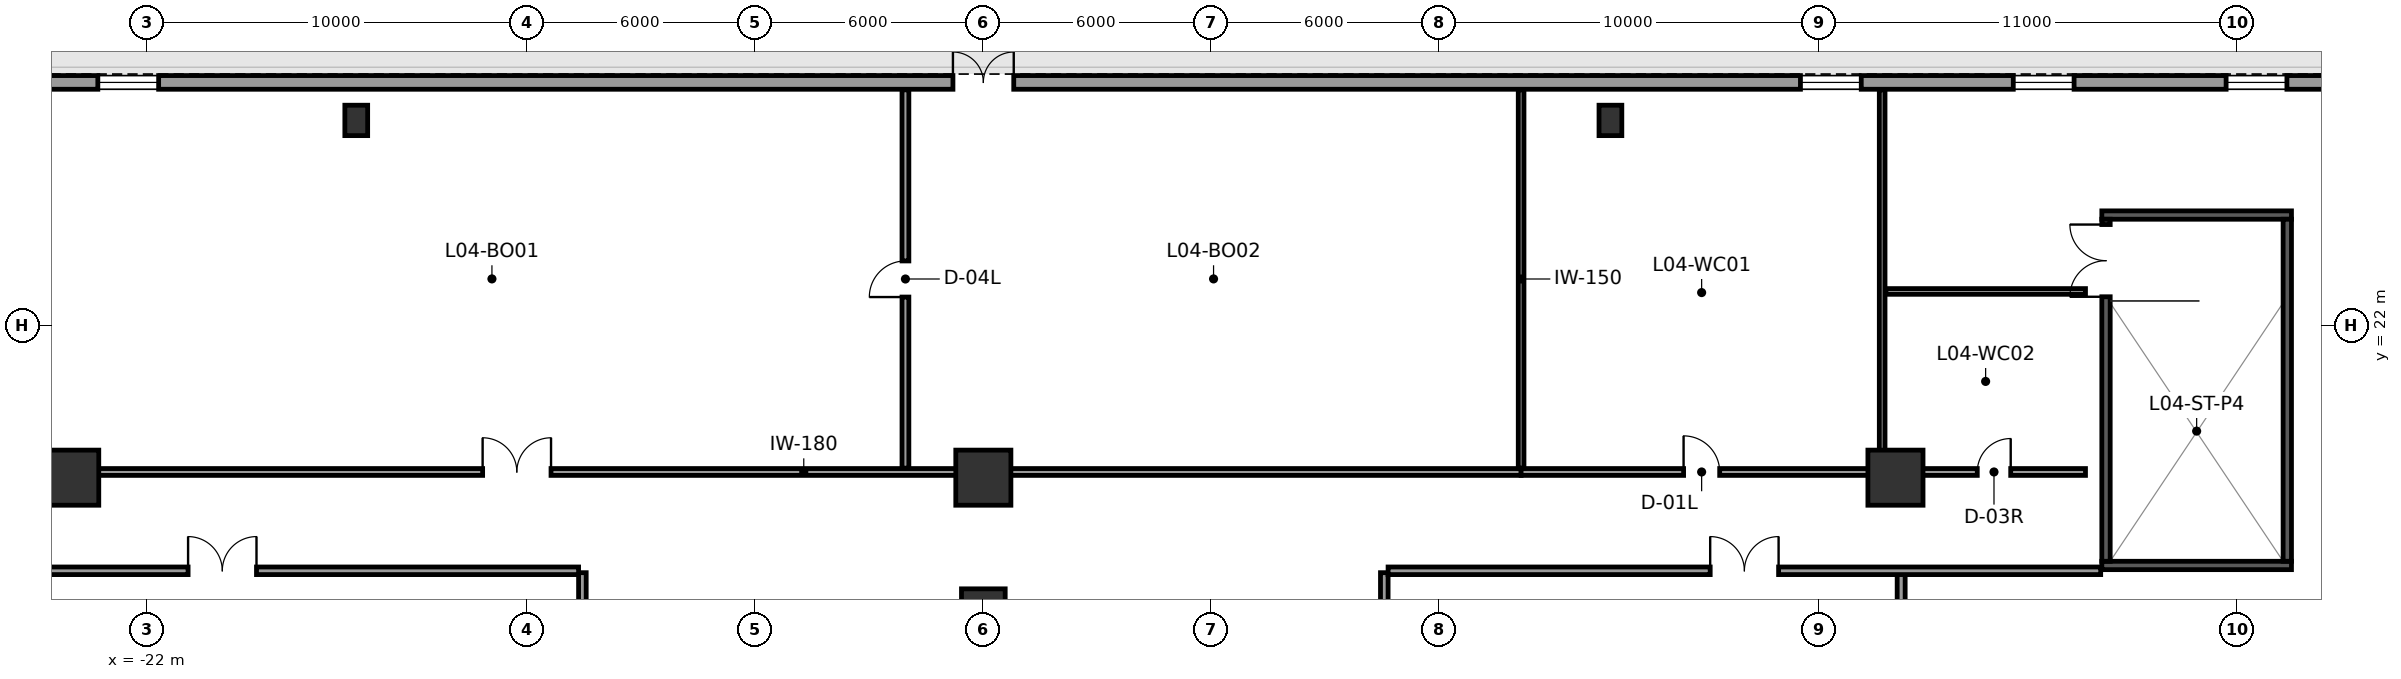
"""IFC4 building model, lengths in metres.
Left out: names, types, materials, properties, quantities, classifications, styles, units other than length and angle.
Written with IfcOpenShell. Run it as: python <this file> out.ifc"""

import sys

from ifc_helpers import new_model, si_unit, direction, frame, frame_2d, origin, origin_2d, place, context, subcontext, project, spatial, rectangle, hollow_rectangle, extrude, element, fill, save


model = new_model("IFC4")
c1 = context("Model", 3, precision=1e-05, world=origin(), true_north=direction((0.0, 1.0)))
c2 = subcontext(c1, "Body", "Model", "MODEL_VIEW")
j1 = project(units=[si_unit("LENGTHUNIT", "METRE"), si_unit("PLANEANGLEUNIT", "RADIAN")], contexts=[c1])
p1 = place(None, origin())
s1 = spatial("IfcSite", under=j1, at=p1, CompositionType="ELEMENT")
p2 = place(p1, origin())
s2 = spatial("IfcBuilding", under=s1, at=p2, CompositionType="ELEMENT")
p3 = place(p2, frame((0.0, 0.0, 23.5)))
s3 = spatial("IfcBuildingStorey", under=s2, at=p3, CompositionType="ELEMENT", Elevation=23.5)
p4 = place(p3, frame((0.0, 14.5, 0.0), z_axis=(0.0, 0.0, 1.0), x_axis=(1.0, 0.0, 0.0)))
e1 = element("IfcColumn", 1, at=p4, inside=s3, PredefinedType="COLUMN", context=c2, shape_type="SweptSolid", body=[
    extrude(rectangle(XDim=1.15, YDim=1.15, at=origin_2d()), origin(), (0.0, 0.0, 1.0), 5.5),
])
for number, where, z_axis, x_axis in (
    (2, (-24.0, 18.0, 0.0), (0.0, 0.0, 1.0), (1.0, 0.0, 0.0)),
    (3, (24.0, 18.0, 0.0), (0.0, 0.0, 1.0), (1.0, 0.0, 0.0)),
    (4, (0.0, 18.0, 0.0), (0.0, 0.0, 1.0), (1.0, 0.0, 0.0)),
):
    element("IfcColumn", number, at=place(p3, frame(where, z_axis=z_axis, x_axis=x_axis)), inside=s3, PredefinedType="COLUMN", context=c2, shape_type="SweptSolid", body=[
        extrude(rectangle(XDim=1.45, YDim=1.45, at=origin_2d()), origin(), (0.0, 0.0, 1.0), 5.5),
    ])
for number, where, z_axis, x_axis in (
    (5, (-16.5, 27.4, 0.0), (0.0, 0.0, 1.0), (1.0, 0.0, 0.0)),
    (6, (16.5, 27.4, 0.0), (0.0, 0.0, 1.0), (1.0, 0.0, 0.0)),
):
    element("IfcColumn", number, at=place(p3, frame(where, z_axis=z_axis, x_axis=x_axis)), inside=s3, PredefinedType="COLUMN", context=c2, shape_type="SweptSolid", body=[
        extrude(hollow_rectangle(XDim=0.6, YDim=0.8, WallThickness=0.05, at=origin_2d()), origin(), (0.0, 0.0, 1.0), 5.5),
    ])
p5 = place(p3, frame((-39.3, 28.4, 0.0), z_axis=(0.0, 0.0, 1.0), x_axis=(1.0, 0.0, 0.0)))
e7 = element("IfcWall", 7, at=p5, inside=s3, PredefinedType="STANDARD", context=c2, shape_type="SweptSolid", body=[
    extrude(rectangle(XDim=78.6, YDim=0.36, at=frame_2d((39.3, 0.0))), origin(), (0.0, 0.0, 1.0), 5.15),
])
p6 = place(p5, frame((38.5, 0.0, 0.0)))
e8 = element("IfcOpeningElement", 8, at=p6, cuts=e7, PredefinedType="OPENING", context=c2, shape_type="SweptSolid", body=[
    extrude(rectangle(XDim=1.6, YDim=2.2, at=frame_2d((0.8, 1.1))), frame((0.0, 0.19, 0.0), z_axis=(0.0, -1.0, 0.0), x_axis=(1.0, 0.0, 0.0)), (0.0, 0.0, 1.0), 0.38),
])
p7 = place(p5, frame((4.8, 0.0, 0.9)))
e9 = element("IfcOpeningElement", 9, at=p7, cuts=e7, PredefinedType="OPENING", context=c2, shape_type="SweptSolid", body=[
    extrude(rectangle(XDim=1.6, YDim=2.6, at=frame_2d((0.8, 1.3))), frame((0.0, 0.19, 0.0), z_axis=(0.0, -1.0, 0.0), x_axis=(1.0, 0.0, 0.0)), (0.0, 0.0, 1.0), 0.38),
])
p8 = place(p5, frame((10.4, 0.0, 0.9)))
e10 = element("IfcOpeningElement", 10, at=p8, cuts=e7, PredefinedType="OPENING", context=c2, shape_type="SweptSolid", body=[
    extrude(rectangle(XDim=1.6, YDim=2.6, at=frame_2d((0.8, 1.3))), frame((0.0, 0.19, 0.0), z_axis=(0.0, -1.0, 0.0), x_axis=(1.0, 0.0, 0.0)), (0.0, 0.0, 1.0), 0.38),
])
p9 = place(p5, frame((16.0, 0.0, 0.9)))
e11 = element("IfcOpeningElement", 11, at=p9, cuts=e7, PredefinedType="OPENING", context=c2, shape_type="SweptSolid", body=[
    extrude(rectangle(XDim=1.6, YDim=2.6, at=frame_2d((0.8, 1.3))), frame((0.0, 0.19, 0.0), z_axis=(0.0, -1.0, 0.0), x_axis=(1.0, 0.0, 0.0)), (0.0, 0.0, 1.0), 0.38),
])
p10 = place(p5, frame((60.8, 0.0, 0.9)))
e12 = element("IfcOpeningElement", 12, at=p10, cuts=e7, PredefinedType="OPENING", context=c2, shape_type="SweptSolid", body=[
    extrude(rectangle(XDim=1.6, YDim=2.6, at=frame_2d((0.8, 1.3))), frame((0.0, 0.19, 0.0), z_axis=(0.0, -1.0, 0.0), x_axis=(1.0, 0.0, 0.0)), (0.0, 0.0, 1.0), 0.38),
])
p11 = place(p5, frame((66.4, 0.0, 0.9)))
e13 = element("IfcOpeningElement", 13, at=p11, cuts=e7, PredefinedType="OPENING", context=c2, shape_type="SweptSolid", body=[
    extrude(rectangle(XDim=1.6, YDim=2.6, at=frame_2d((0.8, 1.3))), frame((0.0, 0.19, 0.0), z_axis=(0.0, -1.0, 0.0), x_axis=(1.0, 0.0, 0.0)), (0.0, 0.0, 1.0), 0.38),
])
p12 = place(p5, frame((72.0, 0.0, 0.9)))
e14 = element("IfcOpeningElement", 14, at=p12, cuts=e7, PredefinedType="OPENING", context=c2, shape_type="SweptSolid", body=[
    extrude(rectangle(XDim=1.6, YDim=2.6, at=frame_2d((0.8, 1.3))), frame((0.0, 0.19, 0.0), z_axis=(0.0, -1.0, 0.0), x_axis=(1.0, 0.0, 0.0)), (0.0, 0.0, 1.0), 0.38),
])
for number, where, z_axis, x_axis in (
    (15, (29.43, 15.69, 0.0), (0.0, 0.0, 1.0), (1.0, 0.0, 0.0)),
    (16, (29.43, 24.91, 0.0), (0.0, 0.0, 1.0), (1.0, 0.0, 0.0)),
):
    element("IfcWall", number, at=place(p3, frame(where, z_axis=z_axis, x_axis=x_axis)), inside=s3, PredefinedType="SHEAR", context=c2, shape_type="SweptSolid", body=[
        extrude(rectangle(XDim=4.99, YDim=0.22, at=frame_2d((2.495, 0.0))), origin(), (0.0, 0.0, 1.0), 5.15),
    ])
p13 = place(p3, frame((29.54, 15.8, 0.0), z_axis=(0.0, 0.0, 1.0), x_axis=(0.0, 1.0, 0.0)))
e17 = element("IfcWall", 17, at=p13, inside=s3, PredefinedType="SHEAR", context=c2, shape_type="SweptSolid", body=[
    extrude(rectangle(XDim=9.0, YDim=0.22, at=frame_2d((4.5, 0.0))), origin(), (0.0, 0.0, 1.0), 5.15),
])
p14 = place(p13, frame((6.96, 0.0, 0.0)))
e18 = element("IfcOpeningElement", 18, at=p14, cuts=e17, PredefinedType="OPENING", context=c2, shape_type="SweptSolid", body=[
    extrude(rectangle(XDim=1.9, YDim=2.2, at=frame_2d((0.95, 1.1))), frame((0.0, 0.12, 0.0), z_axis=(0.0, -1.0, 0.0), x_axis=(1.0, 0.0, 0.0)), (0.0, 0.0, 1.0), 0.24),
])
p15 = place(p3, frame((34.31, 15.8, 0.0), z_axis=(0.0, 0.0, 1.0), x_axis=(0.0, 1.0, 0.0)))
e19 = element("IfcWall", 19, at=p15, inside=s3, PredefinedType="SHEAR", context=c2, shape_type="SweptSolid", body=[
    extrude(rectangle(XDim=9.0, YDim=0.22, at=frame_2d((4.5, 0.0))), origin(), (0.0, 0.0, 1.0), 5.15),
])
p16 = place(p3, frame((-10.55, 1.35, 0.0), z_axis=(0.0, 0.0, 1.0), x_axis=(0.0, 1.0, 0.0)))
e20 = element("IfcWall", 20, at=p16, inside=s3, PredefinedType="PARTITIONING", context=c2, shape_type="SweptSolid", body=[
    extrude(rectangle(XDim=14.15, YDim=0.2, at=frame_2d((7.075, 0.0))), origin(), (0.0, 0.0, 1.0), 5.15),
])
p17 = place(p16, frame((6.175, 0.0, 0.0)))
e21 = element("IfcOpeningElement", 21, at=p17, cuts=e20, PredefinedType="OPENING", context=c2, shape_type="SweptSolid", body=[
    extrude(rectangle(XDim=1.8, YDim=2.2, at=frame_2d((0.9, 1.1))), frame((0.0, 0.11, 0.0), z_axis=(0.0, -1.0, 0.0), x_axis=(1.0, 0.0, 0.0)), (0.0, 0.0, 1.0), 0.22),
])
p18 = place(p3, frame((-2.05, 18.25, 0.0), z_axis=(0.0, 0.0, 1.0), x_axis=(0.0, 1.0, 0.0)))
e22 = element("IfcWall", 22, at=p18, inside=s3, PredefinedType="PARTITIONING", context=c2, shape_type="SweptSolid", body=[
    extrude(rectangle(XDim=9.955, YDim=0.18, at=frame_2d((4.978, 0.0))), origin(), (0.0, 0.0, 1.0), 2.73),
])
p19 = place(p18, frame((4.502, 0.0, 0.0)))
e23 = element("IfcOpeningElement", 23, at=p19, cuts=e22, PredefinedType="OPENING", context=c2, shape_type="SweptSolid", body=[
    extrude(rectangle(XDim=0.95, YDim=2.15, at=frame_2d((0.475, 1.075))), frame((0.0, 0.1, 0.0), z_axis=(0.0, -1.0, 0.0), x_axis=(1.0, 0.0, 0.0)), (0.0, 0.0, 1.0), 0.2),
])
p20 = place(p3, frame((10.55, -1.35, 0.0), z_axis=(0.0, 0.0, 1.0), x_axis=(0.0, 1.0, 0.0)))
e24 = element("IfcWall", 24, at=p20, inside=s3, PredefinedType="PARTITIONING", context=c2, shape_type="SweptSolid", body=[
    extrude(rectangle(XDim=16.85, YDim=0.2, at=frame_2d((8.425, 0.0))), origin(), (0.0, 0.0, 1.0), 5.15),
])
p21 = place(p20, frame((7.525, 0.0, 0.0)))
e25 = element("IfcOpeningElement", 25, at=p21, cuts=e24, PredefinedType="OPENING", context=c2, shape_type="SweptSolid", body=[
    extrude(rectangle(XDim=1.8, YDim=2.2, at=frame_2d((0.9, 1.1))), frame((0.0, 0.11, 0.0), z_axis=(0.0, -1.0, 0.0), x_axis=(1.0, 0.0, 0.0)), (0.0, 0.0, 1.0), 0.22),
])
p22 = place(p3, frame((24.15, -1.25, 0.0), z_axis=(0.0, 0.0, 1.0), x_axis=(0.0, 1.0, 0.0)))
e26 = element("IfcWall", 26, at=p22, inside=s3, PredefinedType="MOVABLE", context=c2, shape_type="SweptSolid", body=[
    extrude(rectangle(XDim=16.75, YDim=0.21, at=frame_2d((8.375, 0.0))), origin(), (0.0, 0.0, 1.0), 3.33),
])
p23 = place(p22, frame((7.475, 0.0, 0.0)))
e27 = element("IfcOpeningElement", 27, at=p23, cuts=e26, PredefinedType="OPENING", context=c2, shape_type="SweptSolid", body=[
    extrude(rectangle(XDim=1.8, YDim=2.2, at=frame_2d((0.9, 1.1))), frame((0.0, 0.115, 0.0), z_axis=(0.0, -1.0, 0.0), x_axis=(1.0, 0.0, 0.0)), (0.0, 0.0, 1.0), 0.23),
])
p24 = place(p3, frame((-29.4, 15.55, 0.0), z_axis=(0.0, 0.0, 1.0), x_axis=(1.0, 0.0, 0.0)))
e28 = element("IfcWall", 28, at=p24, inside=s3, PredefinedType="PARTITIONING", context=c2, shape_type="SweptSolid", body=[
    extrude(rectangle(XDim=18.75, YDim=0.2, at=frame_2d((9.375, 0.0))), origin(), (0.0, 0.0, 1.0), 5.15),
])
p25 = place(p24, frame((8.475, 0.0, 0.0)))
e29 = element("IfcOpeningElement", 29, at=p25, cuts=e28, PredefinedType="OPENING", context=c2, shape_type="SweptSolid", body=[
    extrude(rectangle(XDim=1.8, YDim=2.2, at=frame_2d((0.9, 1.1))), frame((0.0, 0.11, 0.0), z_axis=(0.0, -1.0, 0.0), x_axis=(1.0, 0.0, 0.0)), (0.0, 0.0, 1.0), 0.22),
])
p26 = place(p3, frame((10.65, 15.55, 0.0), z_axis=(0.0, 0.0, 1.0), x_axis=(1.0, 0.0, 0.0)))
e30 = element("IfcWall", 30, at=p26, inside=s3, PredefinedType="PARTITIONING", context=c2, shape_type="SweptSolid", body=[
    extrude(rectangle(XDim=18.75, YDim=0.2, at=frame_2d((9.375, 0.0))), origin(), (0.0, 0.0, 1.0), 5.15),
])
p27 = place(p26, frame((8.475, 0.0, 0.0)))
e31 = element("IfcOpeningElement", 31, at=p27, cuts=e30, PredefinedType="OPENING", context=c2, shape_type="SweptSolid", body=[
    extrude(rectangle(XDim=1.8, YDim=2.2, at=frame_2d((0.9, 1.1))), frame((0.0, 0.11, 0.0), z_axis=(0.0, -1.0, 0.0), x_axis=(1.0, 0.0, 0.0)), (0.0, 0.0, 1.0), 0.22),
])
p28 = place(p3, frame((-23.6, 18.15, 0.0), z_axis=(0.0, 0.0, 1.0), x_axis=(1.0, 0.0, 0.0)))
e32 = element("IfcWall", 32, at=p28, inside=s3, PredefinedType="PARTITIONING", context=c2, shape_type="SweptSolid", body=[
    extrude(rectangle(XDim=37.75, YDim=0.18, at=frame_2d((18.875, 0.0))), origin(), (0.0, 0.0, 1.0), 3.33),
])
p29 = place(p28, frame((10.425, 0.0, 0.0)))
e33 = element("IfcOpeningElement", 33, at=p29, cuts=e32, PredefinedType="OPENING", context=c2, shape_type="SweptSolid", body=[
    extrude(rectangle(XDim=1.8, YDim=2.2, at=frame_2d((0.9, 1.1))), frame((0.0, 0.1, 0.0), z_axis=(0.0, -1.0, 0.0), x_axis=(1.0, 0.0, 0.0)), (0.0, 0.0, 1.0), 0.2),
])
p30 = place(p3, frame((14.15, 18.15, 0.0), z_axis=(0.0, 0.0, 1.0), x_axis=(1.0, 0.0, 0.0)))
e34 = element("IfcWall", 34, at=p30, inside=s3, PredefinedType="PARTITIONING", context=c2, shape_type="SweptSolid", body=[
    extrude(rectangle(XDim=9.5, YDim=0.18, at=frame_2d((4.75, 0.0))), origin(), (0.0, 0.0, 1.0), 3.33),
])
p31 = place(p30, frame((4.275, 0.0, 0.0)))
e35 = element("IfcOpeningElement", 35, at=p31, cuts=e34, PredefinedType="OPENING", context=c2, shape_type="SweptSolid", body=[
    extrude(rectangle(XDim=0.95, YDim=2.15, at=frame_2d((0.475, 1.075))), frame((0.0, 0.1, 0.0), z_axis=(0.0, -1.0, 0.0), x_axis=(1.0, 0.0, 0.0)), (0.0, 0.0, 1.0), 0.2),
])
p32 = place(p3, frame((23.65, 18.15, 0.0), z_axis=(0.0, 0.0, 1.0), x_axis=(1.0, 0.0, 0.0)))
e36 = element("IfcWall", 36, at=p32, inside=s3, PredefinedType="PARTITIONING", context=c2, shape_type="SweptSolid", body=[
    extrude(rectangle(XDim=5.35, YDim=0.18, at=frame_2d((2.675, 0.0))), origin(), (0.0, 0.0, 1.0), 5.15),
])
p33 = place(p32, frame((2.502, 0.0, 0.0)))
e37 = element("IfcOpeningElement", 37, at=p33, cuts=e36, PredefinedType="OPENING", context=c2, shape_type="SweptSolid", body=[
    extrude(rectangle(XDim=0.88, YDim=2.1, at=frame_2d((0.44, 1.05))), frame((0.0, 0.1, 0.0), z_axis=(0.0, -1.0, 0.0), x_axis=(1.0, 0.0, 0.0)), (0.0, 0.0, 1.0), 0.2),
])
for number, where, z_axis, x_axis in (
    (38, (14.15, 18.25, 0.0), (0.0, 0.0, 1.0), (0.0, 1.0, 0.0)),
    (39, (23.65, 18.25, 0.0), (0.0, 0.0, 1.0), (0.0, 1.0, 0.0)),
):
    element("IfcWall", number, at=place(p3, frame(where, z_axis=z_axis, x_axis=x_axis)), inside=s3, PredefinedType="PARTITIONING", context=c2, shape_type="SweptSolid", body=[
        extrude(rectangle(XDim=9.955, YDim=0.15, at=frame_2d((4.978, 0.0))), origin(), (0.0, 0.0, 1.0), 5.15),
    ])
p34 = place(p3, frame((23.75, 22.9, 0.0), z_axis=(0.0, 0.0, 1.0), x_axis=(1.0, 0.0, 0.0)))
e40 = element("IfcWall", 40, at=p34, inside=s3, PredefinedType="PARTITIONING", context=c2, shape_type="SweptSolid", body=[
    extrude(rectangle(XDim=5.25, YDim=0.15, at=frame_2d((2.625, 0.0))), origin(), (0.0, 0.0, 1.0), 5.15),
])
p35 = place(p6, origin())
e41 = element("IfcDoor", 41, at=p35, inside=s3, OperationType="DOUBLE_DOOR_SINGLE_SWING", PredefinedType="DOOR", context=c2, shape_type="SweptSolid", body=[
    extrude(rectangle(XDim=1.6, YDim=2.2, at=frame_2d((0.8, 1.1))), frame((0.0, 0.025, 0.0), z_axis=(0.0, -1.0, 0.0), x_axis=(1.0, 0.0, 0.0)), (0.0, 0.0, 1.0), 0.05),
])
fill(e8, e41)
p36 = place(p9, origin())
e42 = element("IfcWindow", 42, at=p36, inside=s3, PartitioningType="DOUBLE_PANEL_VERTICAL", PredefinedType="WINDOW", context=c2, shape_type="SweptSolid", body=[
    extrude(rectangle(XDim=1.6, YDim=2.6, at=frame_2d((0.8, 1.3))), frame((0.0, 0.03, 0.0), z_axis=(0.0, -1.0, 0.0), x_axis=(1.0, 0.0, 0.0)), (0.0, 0.0, 1.0), 0.06),
])
fill(e11, e42)
p37 = place(p10, origin())
e43 = element("IfcWindow", 43, at=p37, inside=s3, PartitioningType="DOUBLE_PANEL_VERTICAL", PredefinedType="WINDOW", context=c2, shape_type="SweptSolid", body=[
    extrude(rectangle(XDim=1.6, YDim=2.6, at=frame_2d((0.8, 1.3))), frame((0.0, 0.03, 0.0), z_axis=(0.0, -1.0, 0.0), x_axis=(1.0, 0.0, 0.0)), (0.0, 0.0, 1.0), 0.06),
])
fill(e12, e43)
p38 = place(p11, origin())
e44 = element("IfcWindow", 44, at=p38, inside=s3, PartitioningType="DOUBLE_PANEL_VERTICAL", PredefinedType="WINDOW", context=c2, shape_type="SweptSolid", body=[
    extrude(rectangle(XDim=1.6, YDim=2.6, at=frame_2d((0.8, 1.3))), frame((0.0, 0.03, 0.0), z_axis=(0.0, -1.0, 0.0), x_axis=(1.0, 0.0, 0.0)), (0.0, 0.0, 1.0), 0.06),
])
fill(e13, e44)
p39 = place(p12, origin())
e45 = element("IfcWindow", 45, at=p39, inside=s3, PartitioningType="DOUBLE_PANEL_VERTICAL", PredefinedType="WINDOW", context=c2, shape_type="SweptSolid", body=[
    extrude(rectangle(XDim=1.6, YDim=2.6, at=frame_2d((0.8, 1.3))), frame((0.0, 0.03, 0.0), z_axis=(0.0, -1.0, 0.0), x_axis=(1.0, 0.0, 0.0)), (0.0, 0.0, 1.0), 0.06),
])
fill(e14, e45)
p40 = place(p14, origin())
e46 = element("IfcDoor", 46, at=p40, inside=s3, OperationType="DOUBLE_DOOR_SINGLE_SWING", PredefinedType="DOOR", context=c2, shape_type="SweptSolid", body=[
    extrude(rectangle(XDim=1.9, YDim=2.2, at=frame_2d((0.95, 1.1))), frame((0.0, 0.025, 0.0), z_axis=(0.0, -1.0, 0.0), x_axis=(1.0, 0.0, 0.0)), (0.0, 0.0, 1.0), 0.05),
])
fill(e18, e46)
p41 = place(p19, origin())
e47 = element("IfcDoor", 47, at=p41, inside=s3, OperationType="SINGLE_SWING_LEFT", PredefinedType="DOOR", context=c2, shape_type="SweptSolid", body=[
    extrude(rectangle(XDim=0.95, YDim=2.15, at=frame_2d((0.475, 1.075))), frame((0.0, 0.025, 0.0), z_axis=(0.0, -1.0, 0.0), x_axis=(1.0, 0.0, 0.0)), (0.0, 0.0, 1.0), 0.05),
])
fill(e23, e47)
p42 = place(p25, origin())
e48 = element("IfcDoor", 48, at=p42, inside=s3, OperationType="DOUBLE_DOOR_SINGLE_SWING", PredefinedType="DOOR", context=c2, shape_type="SweptSolid", body=[
    extrude(rectangle(XDim=1.8, YDim=2.2, at=frame_2d((0.9, 1.1))), frame((0.0, 0.025, 0.0), z_axis=(0.0, -1.0, 0.0), x_axis=(1.0, 0.0, 0.0)), (0.0, 0.0, 1.0), 0.05),
])
fill(e29, e48)
p43 = place(p27, origin())
e49 = element("IfcDoor", 49, at=p43, inside=s3, OperationType="DOUBLE_DOOR_SINGLE_SWING", PredefinedType="DOOR", context=c2, shape_type="SweptSolid", body=[
    extrude(rectangle(XDim=1.8, YDim=2.2, at=frame_2d((0.9, 1.1))), frame((0.0, 0.025, 0.0), z_axis=(0.0, -1.0, 0.0), x_axis=(1.0, 0.0, 0.0)), (0.0, 0.0, 1.0), 0.05),
])
fill(e31, e49)
p44 = place(p29, origin())
e50 = element("IfcDoor", 50, at=p44, inside=s3, OperationType="DOUBLE_DOOR_SINGLE_SWING", PredefinedType="DOOR", context=c2, shape_type="SweptSolid", body=[
    extrude(rectangle(XDim=1.8, YDim=2.2, at=frame_2d((0.9, 1.1))), frame((0.0, 0.025, 0.0), z_axis=(0.0, -1.0, 0.0), x_axis=(1.0, 0.0, 0.0)), (0.0, 0.0, 1.0), 0.05),
])
fill(e33, e50)
p45 = place(p31, origin())
e51 = element("IfcDoor", 51, at=p45, inside=s3, OperationType="SINGLE_SWING_LEFT", PredefinedType="DOOR", context=c2, shape_type="SweptSolid", body=[
    extrude(rectangle(XDim=0.95, YDim=2.15, at=frame_2d((0.475, 1.075))), frame((0.0, 0.025, 0.0), z_axis=(0.0, -1.0, 0.0), x_axis=(1.0, 0.0, 0.0)), (0.0, 0.0, 1.0), 0.05),
])
fill(e35, e51)
p46 = place(p33, origin())
e52 = element("IfcDoor", 52, at=p46, inside=s3, OperationType="SINGLE_SWING_RIGHT", PredefinedType="DOOR", context=c2, shape_type="SweptSolid", body=[
    extrude(rectangle(XDim=0.88, YDim=2.1, at=frame_2d((0.44, 1.05))), frame((0.0, 0.025, 0.0), z_axis=(0.0, -1.0, 0.0), x_axis=(1.0, 0.0, 0.0)), (0.0, 0.0, 1.0), 0.05),
])
fill(e37, e52)
save(model, sys.argv[1])
